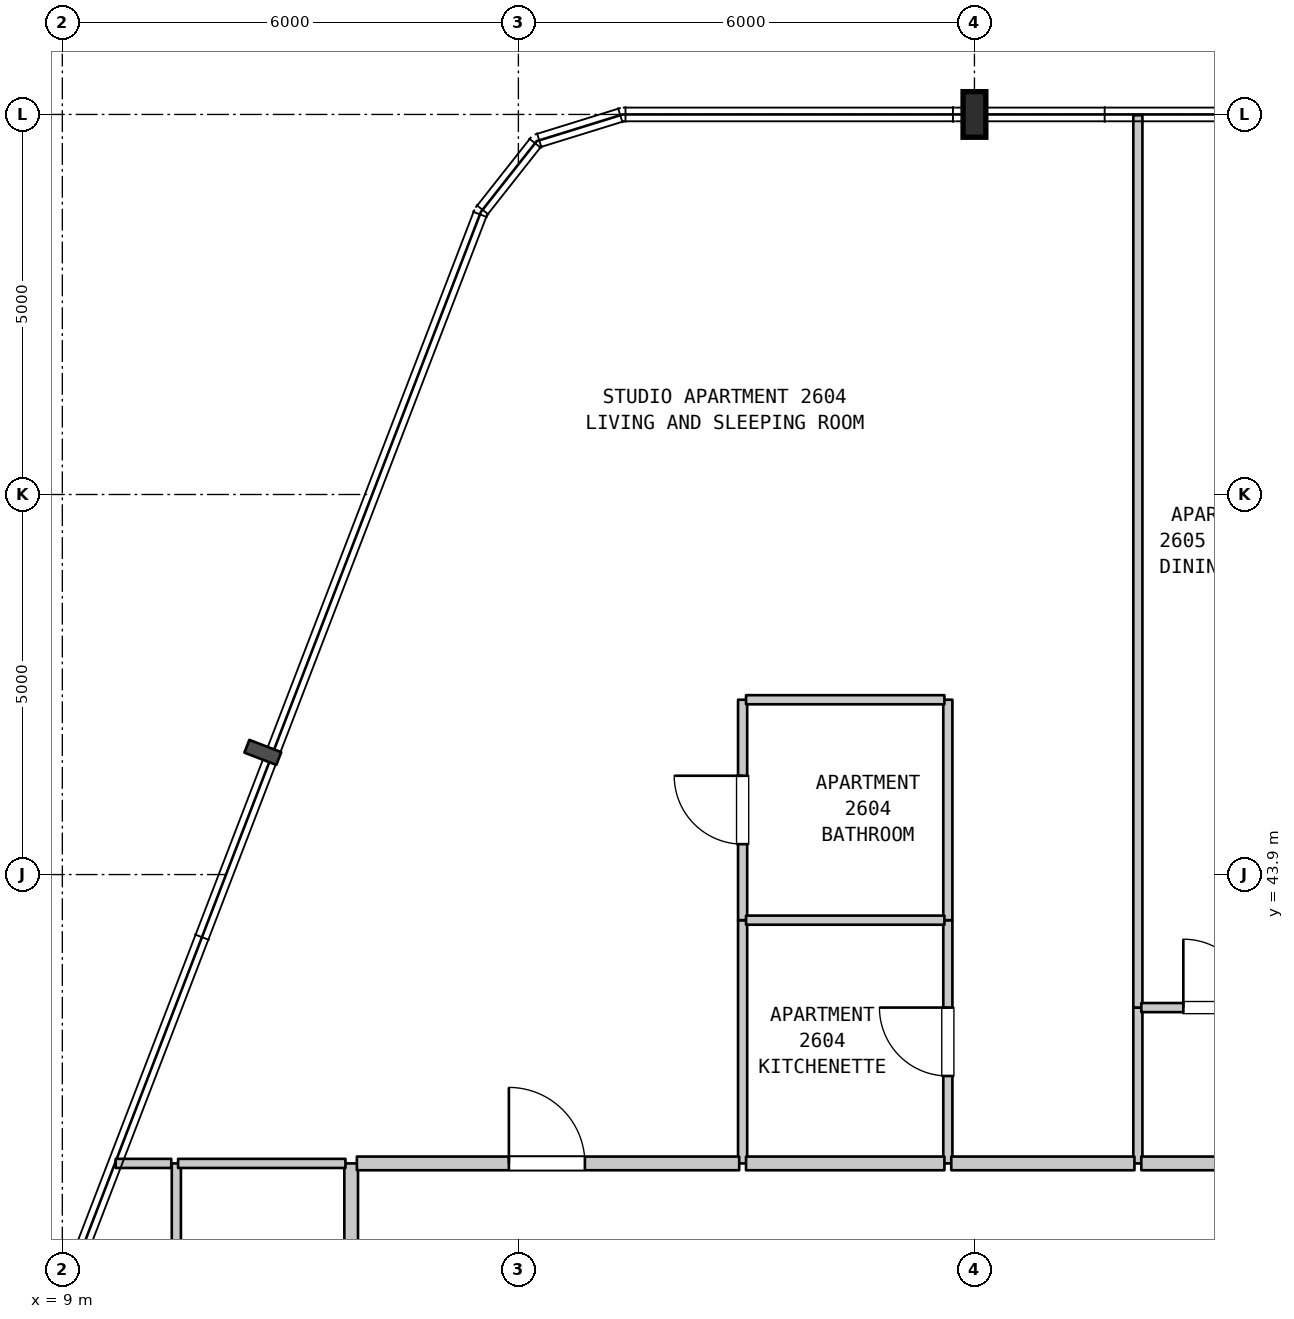
"""IFC4 building model, lengths in metres.
Left out: names, types, materials, properties, quantities, classifications, styles, units other than length and angle.
Written with IfcOpenShell. Run it as: python <this file> out.ifc"""

import sys

from ifc_helpers import new_model, si_unit, direction, frame, frame_2d, origin, origin_2d, place, context, subcontext, project, spatial, rectangle, i_section, extrude, element, fill, save


model = new_model("IFC4")
c1 = context("Model", 3, precision=1e-05, world=origin(), true_north=direction((0.0, 1.0)))
c2 = subcontext(c1, "Body", "Model", "MODEL_VIEW")
j1 = project(units=[si_unit("LENGTHUNIT", "METRE"), si_unit("PLANEANGLEUNIT", "RADIAN")], contexts=[c1])
p1 = place(None, origin())
s1 = spatial("IfcSite", under=j1, at=p1, CompositionType="ELEMENT")
p2 = place(p1, origin())
s2 = spatial("IfcBuilding", under=s1, at=p2, CompositionType="ELEMENT")
p3 = place(p2, frame((0.0, 0.0, 109.4)))
s3 = spatial("IfcBuildingStorey", under=s2, at=p3, CompositionType="ELEMENT", Elevation=109.4)
p4 = place(p3, frame((21.0, 53.9, 0.0), z_axis=(0.0, 0.0, 1.0), x_axis=(1.0, 0.0, 0.0)))
e1 = element("IfcColumn", 1, at=p4, inside=s3, PredefinedType="COLUMN", context=c2, shape_type="SweptSolid", body=[
    extrude(i_section(OverallWidth=0.3, OverallDepth=0.6, WebThickness=0.015, FlangeThickness=0.03, FilletRadius=0.027, at=origin_2d()), origin(), (0.0, 0.0, 1.0), 3.7),
])
p5 = place(p3, frame((10.5, 31.45, 0.0), z_axis=(0.0, 0.0, 1.0), x_axis=(0.0, 1.0, 0.0)))
e2 = element("IfcWall", 2, at=p5, inside=s3, PredefinedType="PARTITIONING", context=c2, shape_type="SweptSolid", body=[
    extrude(rectangle(XDim=8.65, YDim=0.12, at=frame_2d((4.325, 0.0))), origin(), (0.0, 0.0, 1.0), 3.385),
])
p6 = place(p3, frame((12.8, 31.45, 0.0), z_axis=(0.0, 0.0, 1.0), x_axis=(0.0, 1.0, 0.0)))
e3 = element("IfcWall", 3, at=p6, inside=s3, PredefinedType="STANDARD", context=c2, shape_type="SweptSolid", body=[
    extrude(rectangle(XDim=8.65, YDim=0.18, at=frame_2d((4.325, 0.0))), origin(), (0.0, 0.0, 1.0), 3.385),
])
p7 = place(p3, frame((17.95, 40.1, 0.0), z_axis=(0.0, 0.0, 1.0), x_axis=(0.0, 1.0, 0.0)))
e4 = element("IfcWall", 4, at=p7, inside=s3, PredefinedType="PARTITIONING", context=c2, shape_type="SweptSolid", body=[
    extrude(rectangle(XDim=3.2, YDim=0.12, at=frame_2d((1.6, 0.0))), origin(), (0.0, 0.0, 1.0), 3.385),
])
p8 = place(p3, frame((17.95, 43.3, 0.0), z_axis=(0.0, 0.0, 1.0), x_axis=(0.0, 1.0, 0.0)))
e5 = element("IfcWall", 5, at=p8, inside=s3, PredefinedType="PARTITIONING", context=c2, shape_type="SweptSolid", body=[
    extrude(rectangle(XDim=2.9, YDim=0.12, at=frame_2d((1.45, 0.0))), origin(), (0.0, 0.0, 1.0), 3.385),
])
p9 = place(p8, frame((1.0, 0.0, 0.0)))
e6 = element("IfcOpeningElement", 6, at=p9, cuts=e5, PredefinedType="OPENING", context=c2, shape_type="SweptSolid", body=[
    extrude(rectangle(XDim=0.9, YDim=2.1, at=frame_2d((0.45, 1.05))), frame((0.0, 0.07, 0.0), z_axis=(0.0, -1.0, 0.0), x_axis=(1.0, 0.0, 0.0)), (0.0, 0.0, 1.0), 0.14),
])
p10 = place(p3, frame((20.65, 40.1, 0.0), z_axis=(0.0, 0.0, 1.0), x_axis=(0.0, 1.0, 0.0)))
e7 = element("IfcWall", 7, at=p10, inside=s3, PredefinedType="PARTITIONING", context=c2, shape_type="SweptSolid", body=[
    extrude(rectangle(XDim=3.2, YDim=0.12, at=frame_2d((1.6, 0.0))), origin(), (0.0, 0.0, 1.0), 3.385),
])
p11 = place(p10, frame((1.15, 0.0, 0.0)))
e8 = element("IfcOpeningElement", 8, at=p11, cuts=e7, PredefinedType="OPENING", context=c2, shape_type="SweptSolid", body=[
    extrude(rectangle(XDim=0.9, YDim=2.15, at=frame_2d((0.45, 1.075))), frame((0.0, 0.07, 0.0), z_axis=(0.0, -1.0, 0.0), x_axis=(1.0, 0.0, 0.0)), (0.0, 0.0, 1.0), 0.14),
])
p12 = place(p3, frame((20.65, 43.3, 0.0), z_axis=(0.0, 0.0, 1.0), x_axis=(0.0, 1.0, 0.0)))
e9 = element("IfcWall", 9, at=p12, inside=s3, PredefinedType="PARTITIONING", context=c2, shape_type="SweptSolid", body=[
    extrude(rectangle(XDim=2.9, YDim=0.12, at=frame_2d((1.45, 0.0))), origin(), (0.0, 0.0, 1.0), 3.385),
])
p13 = place(p3, frame((23.15, 40.1, 0.0), z_axis=(0.0, 0.0, 1.0), x_axis=(0.0, 1.0, 0.0)))
e10 = element("IfcWall", 10, at=p13, inside=s3, PredefinedType="PARTITIONING", context=c2, shape_type="SweptSolid", body=[
    extrude(rectangle(XDim=2.05, YDim=0.12, at=frame_2d((1.025, 0.0))), origin(), (0.0, 0.0, 1.0), 3.385),
])
p14 = place(p3, frame((23.15, 42.15, 0.0), z_axis=(0.0, 0.0, 1.0), x_axis=(0.0, 1.0, 0.0)))
e11 = element("IfcWall", 11, at=p14, inside=s3, PredefinedType="PARTITIONING", context=c2, shape_type="SweptSolid", body=[
    extrude(rectangle(XDim=11.74, YDim=0.12, at=frame_2d((5.87, 0.0))), origin(), (0.0, 0.0, 1.0), 3.385),
])
p15 = place(p3, frame((9.702, 40.1, 0.0), z_axis=(0.0, 0.0, 1.0), x_axis=(1.0, 0.0, 0.0)))
e12 = element("IfcWall", 12, at=p15, inside=s3, PredefinedType="PARTITIONING", context=c2, shape_type="SweptSolid", body=[
    extrude(rectangle(XDim=0.731, YDim=0.12, at=frame_2d((0.366, 0.0))), origin(), (0.0, 0.0, 1.0), 3.385),
])
p16 = place(p3, frame((10.523, 40.1, 0.0), z_axis=(0.0, 0.0, 1.0), x_axis=(1.0, 0.0, 0.0)))
e13 = element("IfcWall", 13, at=p16, inside=s3, PredefinedType="PARTITIONING", context=c2, shape_type="SweptSolid", body=[
    extrude(rectangle(XDim=2.202, YDim=0.12, at=frame_2d((1.101, 0.0))), origin(), (0.0, 0.0, 1.0), 3.385),
])
p17 = place(p3, frame((12.875, 40.1, 0.0), z_axis=(0.0, 0.0, 1.0), x_axis=(1.0, 0.0, 0.0)))
e14 = element("IfcWall", 14, at=p17, inside=s3, PredefinedType="STANDARD", context=c2, shape_type="SweptSolid", body=[
    extrude(rectangle(XDim=5.03, YDim=0.18, at=frame_2d((2.515, 0.0))), origin(), (0.0, 0.0, 1.0), 3.385),
])
p18 = place(p17, frame((2.0, 0.0, 0.0)))
e15 = element("IfcOpeningElement", 15, at=p18, cuts=e14, PredefinedType="OPENING", context=c2, shape_type="SweptSolid", body=[
    extrude(rectangle(XDim=1.0, YDim=2.15, at=frame_2d((0.5, 1.075))), frame((0.0, 0.1, 0.0), z_axis=(0.0, -1.0, 0.0), x_axis=(1.0, 0.0, 0.0)), (0.0, 0.0, 1.0), 0.2),
])
p19 = place(p3, frame((17.995, 40.1, 0.0), z_axis=(0.0, 0.0, 1.0), x_axis=(1.0, 0.0, 0.0)))
e16 = element("IfcWall", 16, at=p19, inside=s3, PredefinedType="STANDARD", context=c2, shape_type="SweptSolid", body=[
    extrude(rectangle(XDim=2.61, YDim=0.18, at=frame_2d((1.305, 0.0))), origin(), (0.0, 0.0, 1.0), 3.385),
])
p20 = place(p3, frame((20.695, 40.1, 0.0), z_axis=(0.0, 0.0, 1.0), x_axis=(1.0, 0.0, 0.0)))
e17 = element("IfcWall", 17, at=p20, inside=s3, PredefinedType="STANDARD", context=c2, shape_type="SweptSolid", body=[
    extrude(rectangle(XDim=2.41, YDim=0.18, at=frame_2d((1.205, 0.0))), origin(), (0.0, 0.0, 1.0), 3.385),
])
p21 = place(p3, frame((23.195, 40.1, 0.0), z_axis=(0.0, 0.0, 1.0), x_axis=(1.0, 0.0, 0.0)))
e18 = element("IfcWall", 18, at=p21, inside=s3, PredefinedType="STANDARD", context=c2, shape_type="SweptSolid", body=[
    extrude(rectangle(XDim=5.04, YDim=0.18, at=frame_2d((2.52, 0.0))), origin(), (0.0, 0.0, 1.0), 3.385),
])
p22 = place(p21, frame((1.75, 0.0, 0.0)))
e19 = element("IfcOpeningElement", 19, at=p22, cuts=e18, PredefinedType="OPENING", context=c2, shape_type="SweptSolid", body=[
    extrude(rectangle(XDim=1.0, YDim=2.15, at=frame_2d((0.5, 1.075))), frame((0.0, 0.1, 0.0), z_axis=(0.0, -1.0, 0.0), x_axis=(1.0, 0.0, 0.0)), (0.0, 0.0, 1.0), 0.2),
])
p23 = place(p3, frame((23.195, 42.15, 0.0), z_axis=(0.0, 0.0, 1.0), x_axis=(1.0, 0.0, 0.0)))
e20 = element("IfcWall", 20, at=p23, inside=s3, PredefinedType="PARTITIONING", context=c2, shape_type="SweptSolid", body=[
    extrude(rectangle(XDim=2.16, YDim=0.12, at=frame_2d((1.08, 0.0))), origin(), (0.0, 0.0, 1.0), 3.385),
])
p24 = place(p23, frame((0.553, 0.0, 0.0)))
e21 = element("IfcOpeningElement", 21, at=p24, cuts=e20, PredefinedType="OPENING", context=c2, shape_type="SweptSolid", body=[
    extrude(rectangle(XDim=0.9, YDim=2.15, at=frame_2d((0.45, 1.075))), frame((0.0, 0.07, 0.0), z_axis=(0.0, -1.0, 0.0), x_axis=(1.0, 0.0, 0.0)), (0.0, 0.0, 1.0), 0.14),
])
for number, where, z_axis, x_axis in (
    (22, (17.995, 43.3, 0.0), (0.0, 0.0, 1.0), (1.0, 0.0, 0.0)),
    (23, (17.995, 46.2, 0.0), (0.0, 0.0, 1.0), (1.0, 0.0, 0.0)),
):
    element("IfcWall", number, at=place(p3, frame(where, z_axis=z_axis, x_axis=x_axis)), inside=s3, PredefinedType="PARTITIONING", context=c2, shape_type="SweptSolid", body=[
        extrude(rectangle(XDim=2.61, YDim=0.12, at=frame_2d((1.305, 0.0))), origin(), (0.0, 0.0, 1.0), 3.385),
    ])
p25 = place(p9, origin())
e24 = element("IfcDoor", 24, at=p25, inside=s3, OperationType="SINGLE_SWING_RIGHT", PredefinedType="DOOR", context=c2, shape_type="SweptSolid", body=[
    extrude(rectangle(XDim=0.9, YDim=2.1, at=frame_2d((0.45, 1.05))), frame((0.0, 0.025, 0.0), z_axis=(0.0, -1.0, 0.0), x_axis=(1.0, 0.0, 0.0)), (0.0, 0.0, 1.0), 0.05),
])
fill(e6, e24)
p26 = place(p11, origin())
e25 = element("IfcDoor", 25, at=p26, inside=s3, OperationType="SINGLE_SWING_RIGHT", PredefinedType="DOOR", context=c2, shape_type="SweptSolid", body=[
    extrude(rectangle(XDim=0.9, YDim=2.15, at=frame_2d((0.45, 1.075))), frame((0.0, 0.025, 0.0), z_axis=(0.0, -1.0, 0.0), x_axis=(1.0, 0.0, 0.0)), (0.0, 0.0, 1.0), 0.05),
])
fill(e8, e25)
p27 = place(p18, origin())
e26 = element("IfcDoor", 26, at=p27, inside=s3, OperationType="SINGLE_SWING_LEFT", PredefinedType="DOOR", context=c2, shape_type="SweptSolid", body=[
    extrude(rectangle(XDim=1.0, YDim=2.15, at=frame_2d((0.5, 1.075))), frame((0.0, 0.025, 0.0), z_axis=(0.0, -1.0, 0.0), x_axis=(1.0, 0.0, 0.0)), (0.0, 0.0, 1.0), 0.05),
])
fill(e15, e26)
p28 = place(p24, origin())
e27 = element("IfcDoor", 27, at=p28, inside=s3, OperationType="SINGLE_SWING_LEFT", PredefinedType="DOOR", context=c2, shape_type="SweptSolid", body=[
    extrude(rectangle(XDim=0.9, YDim=2.15, at=frame_2d((0.45, 1.075))), frame((0.0, 0.025, 0.0), z_axis=(0.0, -1.0, 0.0), x_axis=(1.0, 0.0, 0.0)), (0.0, 0.0, 1.0), 0.05),
])
fill(e21, e27)
save(model, sys.argv[1])
